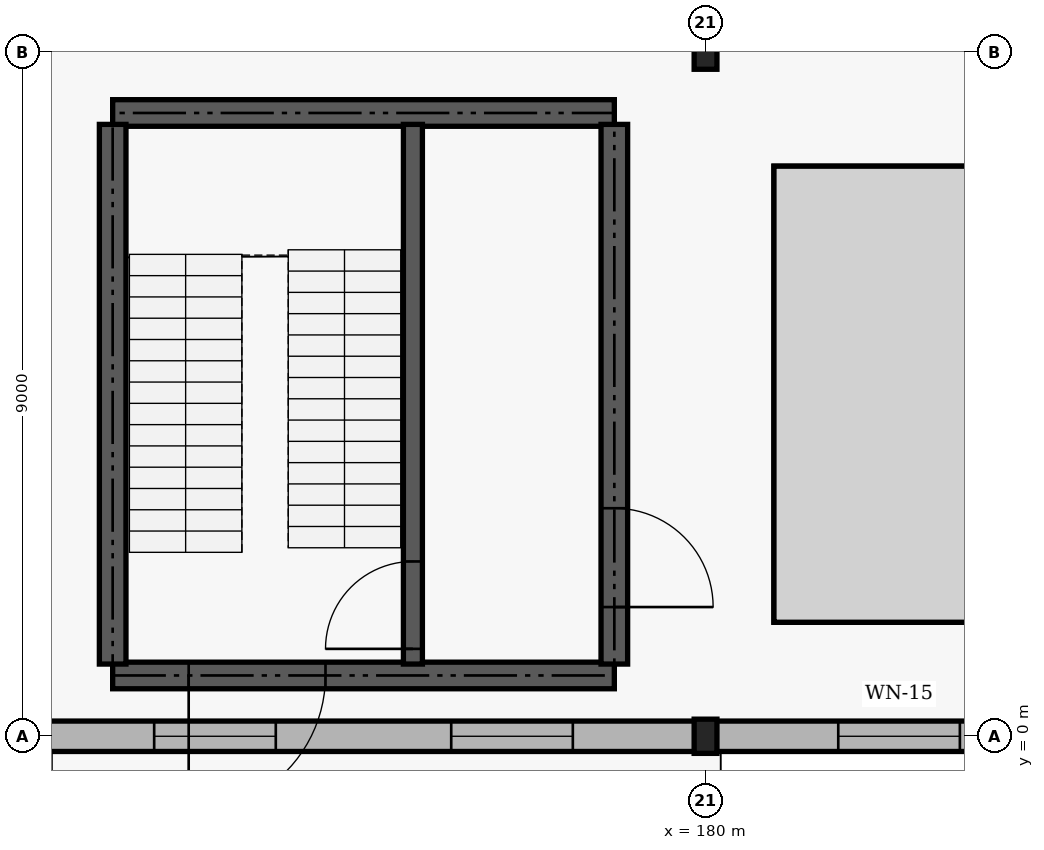
"""IFC4 building model, lengths in metres.
Left out: names, types, materials, properties, quantities, classifications, styles, units other than length and angle.
Written with IfcOpenShell. Run it as: python <this file> out.ifc"""

import sys

from ifc_helpers import new_model, si_unit, direction, frame, frame_2d, origin, origin_2d, place, context, subcontext, project, spatial, rectangle, i_section, extrude, element, fill, save


model = new_model("IFC4")
c1 = context("Model", 3, precision=1e-05, world=origin(), true_north=direction((0.0, 1.0)))
c2 = subcontext(c1, "Body", "Model", "MODEL_VIEW")
j1 = project(units=[si_unit("LENGTHUNIT", "METRE"), si_unit("PLANEANGLEUNIT", "RADIAN")], contexts=[c1])
p1 = place(None, origin())
s1 = spatial("IfcSite", under=j1, at=p1, CompositionType="ELEMENT")
p2 = place(p1, origin())
s2 = spatial("IfcBuilding", under=s1, at=p2, CompositionType="ELEMENT")
p3 = place(p2, origin())
s3 = spatial("IfcBuildingStorey", under=s2, at=p3, CompositionType="ELEMENT", Elevation=0.0)
for number, where, z_axis, x_axis in (
    (1, (180.0, 0.0, 0.0), (0.0, 0.0, 1.0), (1.0, 0.0, 0.0)),
    (2, (180.0, 9.0, 0.0), (0.0, 0.0, 1.0), (1.0, 0.0, 0.0)),
):
    element("IfcColumn", number, at=place(p3, frame(where, z_axis=z_axis, x_axis=x_axis)), inside=s3, PredefinedType="COLUMN", context=c2, shape_type="SweptSolid", body=[
        extrude(i_section(OverallWidth=0.3, OverallDepth=0.45, WebThickness=0.014, FlangeThickness=0.026, FilletRadius=0.027, at=origin_2d()), origin(), (0.0, 0.0, 1.0), 5.4),
    ])
p4 = place(p3, frame((171.06, 0.0, 0.0), z_axis=(0.0, 0.0, 1.0), x_axis=(1.0, 0.0, 0.0)))
e3 = element("IfcWall", 3, at=p4, inside=s3, PredefinedType="SOLIDWALL", context=c2, shape_type="SweptSolid", body=[
    extrude(rectangle(XDim=8.88, YDim=0.4, at=frame_2d((4.44, 0.0))), origin(), (0.0, 0.0, 1.0), 4.7),
])
p5 = place(p4, frame((1.686, 0.0, 0.9)))
e4 = element("IfcOpeningElement", 4, at=p5, cuts=e3, PredefinedType="OPENING", context=c2, shape_type="SweptSolid", body=[
    extrude(rectangle(XDim=1.6, YDim=2.4, at=frame_2d((0.8, 1.2))), frame((0.0, 0.21, 0.0), z_axis=(0.0, -1.0, 0.0), x_axis=(1.0, 0.0, 0.0)), (0.0, 0.0, 1.0), 0.42),
])
p6 = place(p4, frame((5.594, 0.0, 0.9)))
e5 = element("IfcOpeningElement", 5, at=p6, cuts=e3, PredefinedType="OPENING", context=c2, shape_type="SweptSolid", body=[
    extrude(rectangle(XDim=1.6, YDim=2.4, at=frame_2d((0.8, 1.2))), frame((0.0, 0.21, 0.0), z_axis=(0.0, -1.0, 0.0), x_axis=(1.0, 0.0, 0.0)), (0.0, 0.0, 1.0), 0.42),
])
p7 = place(p3, frame((180.06, 0.0, 0.0), z_axis=(0.0, 0.0, 1.0), x_axis=(1.0, 0.0, 0.0)))
e6 = element("IfcWall", 6, at=p7, inside=s3, PredefinedType="SOLIDWALL", context=c2, shape_type="SweptSolid", body=[
    extrude(rectangle(XDim=8.88, YDim=0.4, at=frame_2d((4.44, 0.0))), origin(), (0.0, 0.0, 1.0), 4.7),
])
p8 = place(p7, frame((1.686, 0.0, 0.9)))
e7 = element("IfcOpeningElement", 7, at=p8, cuts=e6, PredefinedType="OPENING", context=c2, shape_type="SweptSolid", body=[
    extrude(rectangle(XDim=1.6, YDim=2.4, at=frame_2d((0.8, 1.2))), frame((0.0, 0.21, 0.0), z_axis=(0.0, -1.0, 0.0), x_axis=(1.0, 0.0, 0.0)), (0.0, 0.0, 1.0), 0.42),
])
p9 = place(p7, frame((5.594, 0.0, 0.9)))
e8 = element("IfcOpeningElement", 8, at=p9, cuts=e6, PredefinedType="OPENING", context=c2, shape_type="SweptSolid", body=[
    extrude(rectangle(XDim=1.6, YDim=2.4, at=frame_2d((0.8, 1.2))), frame((0.0, 0.21, 0.0), z_axis=(0.0, -1.0, 0.0), x_axis=(1.0, 0.0, 0.0)), (0.0, 0.0, 1.0), 0.42),
])
p10 = place(p3, frame((172.2, 0.8, 0.0), z_axis=(0.0, 0.0, 1.0), x_axis=(1.0, 0.0, 0.0)))
e9 = element("IfcWall", 9, at=p10, inside=s3, PredefinedType="SHEAR", context=c2, shape_type="SweptSolid", body=[
    extrude(rectangle(XDim=6.6, YDim=0.35, at=frame_2d((3.3, 0.0))), origin(), (0.0, 0.0, 1.0), 5.4),
])
p11 = place(p10, frame((1.0, 0.0, 0.0)))
e10 = element("IfcOpeningElement", 10, at=p11, cuts=e9, PredefinedType="OPENING", context=c2, shape_type="SweptSolid", body=[
    extrude(rectangle(XDim=1.8, YDim=2.15, at=frame_2d((0.9, 1.075))), frame((0.0, 0.185, 0.0), z_axis=(0.0, -1.0, 0.0), x_axis=(1.0, 0.0, 0.0)), (0.0, 0.0, 1.0), 0.37),
])
p12 = place(p3, frame((172.2, 8.2, 0.0), z_axis=(0.0, 0.0, 1.0), x_axis=(1.0, 0.0, 0.0)))
e11 = element("IfcWall", 11, at=p12, inside=s3, PredefinedType="SHEAR", context=c2, shape_type="SweptSolid", body=[
    extrude(rectangle(XDim=6.6, YDim=0.35, at=frame_2d((3.3, 0.0))), origin(), (0.0, 0.0, 1.0), 5.4),
])
p13 = place(p3, frame((172.2, 0.95, 0.0), z_axis=(0.0, 0.0, 1.0), x_axis=(0.0, 1.0, 0.0)))
e12 = element("IfcWall", 12, at=p13, inside=s3, PredefinedType="SHEAR", context=c2, shape_type="SweptSolid", body=[
    extrude(rectangle(XDim=7.1, YDim=0.35, at=frame_2d((3.55, 0.0))), origin(), (0.0, 0.0, 1.0), 5.4),
])
p14 = place(p3, frame((178.8, 0.95, 0.0), z_axis=(0.0, 0.0, 1.0), x_axis=(0.0, 1.0, 0.0)))
e13 = element("IfcWall", 13, at=p14, inside=s3, PredefinedType="SHEAR", context=c2, shape_type="SweptSolid", body=[
    extrude(rectangle(XDim=7.1, YDim=0.35, at=frame_2d((3.55, 0.0))), origin(), (0.0, 0.0, 1.0), 5.4),
])
p15 = place(p14, frame((0.75, 0.0, 0.0)))
e14 = element("IfcOpeningElement", 14, at=p15, cuts=e13, PredefinedType="OPENING", context=c2, shape_type="SweptSolid", body=[
    extrude(rectangle(XDim=1.3, YDim=2.15, at=frame_2d((0.65, 1.075))), frame((0.0, 0.185, 0.0), z_axis=(0.0, -1.0, 0.0), x_axis=(1.0, 0.0, 0.0)), (0.0, 0.0, 1.0), 0.37),
])
p16 = place(p3, frame((176.15, 0.95, 0.0), z_axis=(0.0, 0.0, 1.0), x_axis=(0.0, 1.0, 0.0)))
e15 = element("IfcWall", 15, at=p16, inside=s3, PredefinedType="SHEAR", context=c2, shape_type="SweptSolid", body=[
    extrude(rectangle(XDim=7.1, YDim=0.25, at=frame_2d((3.55, 0.0))), origin(), (0.0, 0.0, 1.0), 5.4),
])
p17 = place(p16, frame((0.2, 0.0, 0.0)))
e16 = element("IfcOpeningElement", 16, at=p17, cuts=e15, PredefinedType="OPENING", context=c2, shape_type="SweptSolid", body=[
    extrude(rectangle(XDim=1.15, YDim=2.15, at=frame_2d((0.575, 1.075))), frame((0.0, 0.135, 0.0), z_axis=(0.0, -1.0, 0.0), x_axis=(1.0, 0.0, 0.0)), (0.0, 0.0, 1.0), 0.27),
])
p18 = place(p5, origin())
e17 = element("IfcWindow", 17, at=p18, inside=s3, PartitioningType="SINGLE_PANEL", PredefinedType="WINDOW", context=c2, shape_type="SweptSolid", body=[
    extrude(rectangle(XDim=1.6, YDim=2.4, at=frame_2d((0.8, 1.2))), frame((0.0, 0.03, 0.0), z_axis=(0.0, -1.0, 0.0), x_axis=(1.0, 0.0, 0.0)), (0.0, 0.0, 1.0), 0.06),
])
fill(e4, e17)
p19 = place(p6, origin())
e18 = element("IfcWindow", 18, at=p19, inside=s3, PartitioningType="SINGLE_PANEL", PredefinedType="WINDOW", context=c2, shape_type="SweptSolid", body=[
    extrude(rectangle(XDim=1.6, YDim=2.4, at=frame_2d((0.8, 1.2))), frame((0.0, 0.03, 0.0), z_axis=(0.0, -1.0, 0.0), x_axis=(1.0, 0.0, 0.0)), (0.0, 0.0, 1.0), 0.06),
])
fill(e5, e18)
p20 = place(p8, origin())
e19 = element("IfcWindow", 19, at=p20, inside=s3, PartitioningType="SINGLE_PANEL", PredefinedType="WINDOW", context=c2, shape_type="SweptSolid", body=[
    extrude(rectangle(XDim=1.6, YDim=2.4, at=frame_2d((0.8, 1.2))), frame((0.0, 0.03, 0.0), z_axis=(0.0, -1.0, 0.0), x_axis=(1.0, 0.0, 0.0)), (0.0, 0.0, 1.0), 0.06),
])
fill(e7, e19)
p21 = place(p15, frame((1.3, 0.0, 0.0), z_axis=(0.0, 0.0, 1.0), x_axis=(-1.0, 0.0, 0.0)))
e20 = element("IfcDoor", 20, at=p21, inside=s3, OperationType="DOUBLE_DOOR_SINGLE_SWING", PredefinedType="DOOR", context=c2, shape_type="SweptSolid", body=[
    extrude(rectangle(XDim=1.3, YDim=2.15, at=frame_2d((0.65, 1.075))), frame((0.0, 0.025, 0.0), z_axis=(0.0, -1.0, 0.0), x_axis=(1.0, 0.0, 0.0)), (0.0, 0.0, 1.0), 0.05),
])
fill(e14, e20)
p22 = place(p17, origin())
e21 = element("IfcDoor", 21, at=p22, inside=s3, OperationType="SINGLE_SWING_LEFT", PredefinedType="DOOR", context=c2, shape_type="SweptSolid", body=[
    extrude(rectangle(XDim=1.15, YDim=2.15, at=frame_2d((0.575, 1.075))), frame((0.0, 0.025, 0.0), z_axis=(0.0, -1.0, 0.0), x_axis=(1.0, 0.0, 0.0)), (0.0, 0.0, 1.0), 0.05),
])
fill(e16, e21)
p23 = place(p11, frame((1.8, 0.0, 0.0), z_axis=(0.0, 0.0, 1.0), x_axis=(-1.0, 0.0, 0.0)))
e22 = element("IfcDoor", 22, at=p23, inside=s3, OperationType="DOUBLE_DOOR_SINGLE_SWING", PredefinedType="DOOR", context=c2, shape_type="SweptSolid", body=[
    extrude(rectangle(XDim=1.8, YDim=2.15, at=frame_2d((0.9, 1.075))), frame((0.0, 0.025, 0.0), z_axis=(0.0, -1.0, 0.0), x_axis=(1.0, 0.0, 0.0)), (0.0, 0.0, 1.0), 0.05),
])
fill(e10, e22)
save(model, sys.argv[1])
